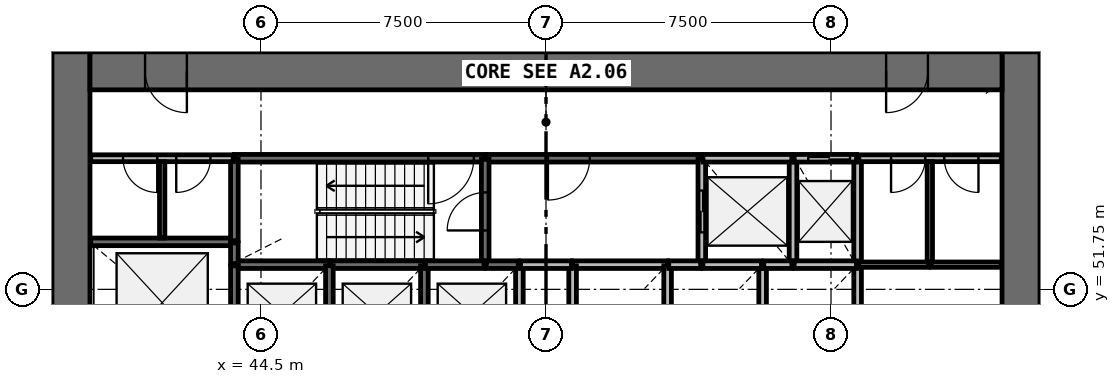
"""IFC4 building model, lengths in metres.
Left out: names, types, materials, properties, quantities, classifications, styles, units other than length and angle.
Written with IfcOpenShell. Run it as: python <this file> out.ifc"""

import sys

from ifc_helpers import new_model, si_unit, direction, frame, frame_2d, origin, place, context, subcontext, project, spatial, rectangle, extrude, source, transform, mapped, element, fill, save


model = new_model("IFC4")
c1 = context("Model", 3, precision=1e-05, world=origin(), true_north=direction((0.0, 1.0)))
c2 = subcontext(c1, "Body", "Model", "MODEL_VIEW")
j1 = project(units=[si_unit("LENGTHUNIT", "METRE"), si_unit("PLANEANGLEUNIT", "RADIAN")], contexts=[c1])
p1 = place(None, origin())
s1 = spatial("IfcSite", under=j1, at=p1, CompositionType="ELEMENT")
p2 = place(p1, origin())
s2 = spatial("IfcBuilding", under=s1, at=p2, CompositionType="ELEMENT")
p3 = place(p2, frame((0.0, 0.0, 22.6)))
s3 = spatial("IfcBuildingStorey", under=s2, at=p3, CompositionType="ELEMENT", Elevation=22.6)
p4 = place(p3, frame((64.5, 38.0, 0.0), z_axis=(0.0, 0.0, 1.0), x_axis=(0.0, 1.0, 0.0)))
e1 = element("IfcWall", 1, at=p4, inside=s3, PredefinedType="SHEAR", context=c2, shape_type="SweptSolid", body=[
    extrude(rectangle(XDim=20.0, YDim=1.0, at=frame_2d((10.0, 0.0))), origin(), (0.0, 0.0, 1.0), 4.4),
])
p5 = place(p4, frame((9.1, 0.0, 0.0)))
e2 = element("IfcOpeningElement", 2, at=p5, cuts=e1, PredefinedType="OPENING", context=c2, shape_type="SweptSolid", body=[
    extrude(rectangle(XDim=1.8, YDim=2.1, at=frame_2d((0.9, 1.05))), frame((0.0, 0.51, 0.0), z_axis=(0.0, -1.0, 0.0), x_axis=(1.0, 0.0, 0.0)), (0.0, 0.0, 1.0), 1.02),
])
p6 = place(p3, frame((39.5, 58.0, 0.0), z_axis=(0.0, 0.0, 1.0), x_axis=(0.0, -1.0, 0.0)))
e3 = element("IfcWall", 3, at=p6, inside=s3, PredefinedType="SHEAR", context=c2, shape_type="SweptSolid", body=[
    extrude(rectangle(XDim=20.0, YDim=1.0, at=frame_2d((10.0, 0.0))), origin(), (0.0, 0.0, 1.0), 4.4),
])
p7 = place(p6, frame((9.1, 0.0, 0.0)))
e4 = element("IfcOpeningElement", 4, at=p7, cuts=e3, PredefinedType="OPENING", context=c2, shape_type="SweptSolid", body=[
    extrude(rectangle(XDim=1.8, YDim=2.1, at=frame_2d((0.9, 1.05))), frame((0.0, 0.51, 0.0), z_axis=(0.0, -1.0, 0.0), x_axis=(1.0, 0.0, 0.0)), (0.0, 0.0, 1.0), 1.02),
])
p8 = place(p3, frame((64.0, 57.5, 0.0), z_axis=(0.0, 0.0, 1.0), x_axis=(-1.0, 0.0, 0.0)))
e5 = element("IfcWall", 5, at=p8, inside=s3, PredefinedType="SHEAR", context=c2, shape_type="SweptSolid", body=[
    extrude(rectangle(XDim=24.0, YDim=1.0, at=frame_2d((12.0, 0.0))), origin(), (0.0, 0.0, 1.0), 4.4),
])
p9 = place(p8, frame((21.45, 0.0, 0.0)))
e6 = element("IfcOpeningElement", 6, at=p9, cuts=e5, PredefinedType="OPENING", context=c2, shape_type="SweptSolid", body=[
    extrude(rectangle(XDim=1.1, YDim=2.1, at=frame_2d((0.55, 1.05))), frame((0.0, 0.51, 0.0), z_axis=(0.0, -1.0, 0.0), x_axis=(1.0, 0.0, 0.0)), (0.0, 0.0, 1.0), 1.02),
])
p10 = place(p8, frame((1.95, 0.0, 0.0)))
e7 = element("IfcOpeningElement", 7, at=p10, cuts=e5, PredefinedType="OPENING", context=c2, shape_type="SweptSolid", body=[
    extrude(rectangle(XDim=1.1, YDim=2.1, at=frame_2d((0.55, 1.05))), frame((0.0, 0.51, 0.0), z_axis=(0.0, -1.0, 0.0), x_axis=(1.0, 0.0, 0.0)), (0.0, 0.0, 1.0), 1.02),
])
p11 = place(p3, frame((50.4, 55.2, 0.0), z_axis=(0.0, 0.0, 1.0), x_axis=(-1.0, 0.0, 0.0)))
e8 = element("IfcWall", 8, at=p11, inside=s3, PredefinedType="SOLIDWALL", context=c2, shape_type="SweptSolid", body=[
    extrude(rectangle(XDim=6.6, YDim=0.2, at=frame_2d((3.3, 0.0))), origin(), (0.0, 0.0, 1.0), 3.95),
])
p12 = place(p11, frame((0.3, 0.0, 0.0)))
e9 = element("IfcOpeningElement", 9, at=p12, cuts=e8, PredefinedType="OPENING", context=c2, shape_type="SweptSolid", body=[
    extrude(rectangle(XDim=1.2, YDim=2.1, at=frame_2d((0.6, 1.05))), frame((0.0, 0.11, 0.0), z_axis=(0.0, -1.0, 0.0), x_axis=(1.0, 0.0, 0.0)), (0.0, 0.0, 1.0), 0.22),
])
p13 = place(p3, frame((56.1, 55.2, 0.0), z_axis=(0.0, 0.0, 1.0), x_axis=(-1.0, 0.0, 0.0)))
e10 = element("IfcWall", 10, at=p13, inside=s3, PredefinedType="SOLIDWALL", context=c2, shape_type="SweptSolid", body=[
    extrude(rectangle(XDim=5.67, YDim=0.2, at=frame_2d((2.835, 0.0))), origin(), (0.0, 0.0, 1.0), 3.95),
])
p14 = place(p13, frame((2.95, 0.0, 0.0)))
e11 = element("IfcOpeningElement", 11, at=p14, cuts=e10, PredefinedType="OPENING", context=c2, shape_type="SweptSolid", body=[
    extrude(rectangle(XDim=1.1, YDim=2.1, at=frame_2d((0.55, 1.05))), frame((0.0, 0.11, 0.0), z_axis=(0.0, -1.0, 0.0), x_axis=(1.0, 0.0, 0.0)), (0.0, 0.0, 1.0), 0.22),
])
p15 = place(p3, frame((43.8, 53.0, 0.0), z_axis=(0.0, 0.0, 1.0), x_axis=(-1.0, 0.0, 0.0)))
e12 = element("IfcWall", 12, at=p15, inside=s3, PredefinedType="SOLIDWALL", context=c2, shape_type="SweptSolid", body=[
    extrude(rectangle(XDim=3.78, YDim=0.2, at=frame_2d((1.89, 0.0))), origin(), (0.0, 0.0, 1.0), 3.95),
])
p16 = place(p3, frame((50.4, 52.4, 0.0), z_axis=(0.0, 0.0, 1.0), x_axis=(0.0, 1.0, 0.0)))
e13 = element("IfcWall", 13, at=p16, inside=s3, PredefinedType="SOLIDWALL", context=c2, shape_type="SweptSolid", body=[
    extrude(rectangle(XDim=2.77, YDim=0.2, at=frame_2d((1.385, 0.0))), origin(), (0.0, 0.0, 1.0), 3.95),
])
p17 = place(p16, frame((0.9, 0.0, 0.0)))
e14 = element("IfcOpeningElement", 14, at=p17, cuts=e13, PredefinedType="OPENING", context=c2, shape_type="SweptSolid", body=[
    extrude(rectangle(XDim=1.0, YDim=2.1, at=frame_2d((0.5, 1.05))), frame((0.0, 0.11, 0.0), z_axis=(0.0, -1.0, 0.0), x_axis=(1.0, 0.0, 0.0)), (0.0, 0.0, 1.0), 0.22),
])
p18 = place(p3, frame((56.1, 55.17, 0.0), z_axis=(0.0, 0.0, 1.0), x_axis=(0.0, -1.0, 0.0)))
e15 = element("IfcWall", 15, at=p18, inside=s3, PredefinedType="SOLIDWALL", context=c2, shape_type="SweptSolid", body=[
    extrude(rectangle(XDim=2.77, YDim=0.2, at=frame_2d((1.385, 0.0))), origin(), (0.0, 0.0, 1.0), 3.95),
])
p19 = place(p18, frame((0.82, 0.0, 0.0)))
e16 = element("IfcOpeningElement", 16, at=p19, cuts=e15, PredefinedType="OPENING", context=c2, shape_type="SweptSolid", body=[
    extrude(rectangle(XDim=1.1, YDim=2.1, at=frame_2d((0.55, 1.05))), frame((0.0, 0.11, 0.0), z_axis=(0.0, -1.0, 0.0), x_axis=(1.0, 0.0, 0.0)), (0.0, 0.0, 1.0), 0.22),
])
for number, where, z_axis, x_axis in (
    (17, (58.5, 52.4, 0.0), (0.0, 0.0, 1.0), (0.0, 1.0, 0.0)),
    (18, (60.2, 52.4, 0.0), (0.0, 0.0, 1.0), (0.0, 1.0, 0.0)),
):
    element("IfcWall", number, at=place(p3, frame(where, z_axis=z_axis, x_axis=x_axis)), inside=s3, PredefinedType="SOLIDWALL", context=c2, shape_type="SweptSolid", body=[
        extrude(rectangle(XDim=2.8, YDim=0.2, at=frame_2d((1.4, 0.0))), origin(), (0.0, 0.0, 1.0), 3.95),
    ])
p20 = place(p3, frame((46.3, 52.4, 0.0), z_axis=(0.0, 0.0, 1.0), x_axis=(-1.0, 0.0, 0.0)))
e19 = element("IfcWall", 19, at=p20, inside=s3, PredefinedType="SOLIDWALL", context=c2, shape_type="SweptSolid", body=[
    extrude(rectangle(XDim=2.5, YDim=0.2, at=frame_2d((1.25, 0.0))), origin(), (0.0, 0.0, 1.0), 3.95),
])
p21 = place(p3, frame((48.8, 52.4, 0.0), z_axis=(0.0, 0.0, 1.0), x_axis=(-1.0, 0.0, 0.0)))
e20 = element("IfcWall", 20, at=p21, inside=s3, PredefinedType="SOLIDWALL", context=c2, shape_type="SweptSolid", body=[
    extrude(rectangle(XDim=2.47, YDim=0.2, at=frame_2d((1.235, 0.0))), origin(), (0.0, 0.0, 1.0), 3.95),
])
p22 = place(p3, frame((55.2, 52.4, 0.0), z_axis=(0.0, 0.0, 1.0), x_axis=(-1.0, 0.0, 0.0)))
e21 = element("IfcWall", 21, at=p22, inside=s3, PredefinedType="SOLIDWALL", context=c2, shape_type="SweptSolid", body=[
    extrude(rectangle(XDim=2.5, YDim=0.2, at=frame_2d((1.25, 0.0))), origin(), (0.0, 0.0, 1.0), 3.95),
])
p23 = place(p3, frame((58.47, 55.2, 0.0), z_axis=(0.0, 0.0, 1.0), x_axis=(-1.0, 0.0, 0.0)))
e22 = element("IfcWall", 22, at=p23, inside=s3, PredefinedType="SOLIDWALL", context=c2, shape_type="SweptSolid", body=[
    extrude(rectangle(XDim=2.34, YDim=0.2, at=frame_2d((1.17, 0.0))), origin(), (0.0, 0.0, 1.0), 3.95),
])
for number, where, z_axis, x_axis in (
    (23, (43.8, 52.37, 0.0), (0.0, 0.0, 1.0), (0.0, -1.0, 0.0)),
    (24, (46.3, 50.01, 0.0), (0.0, 0.0, 1.0), (0.0, 1.0, 0.0)),
    (25, (48.8, 50.01, 0.0), (0.0, 0.0, 1.0), (0.0, 1.0, 0.0)),
):
    element("IfcWall", number, at=place(p3, frame(where, z_axis=z_axis, x_axis=x_axis)), inside=s3, PredefinedType="SOLIDWALL", context=c2, shape_type="SweptSolid", body=[
        extrude(rectangle(XDim=2.36, YDim=0.2, at=frame_2d((1.18, 0.0))), origin(), (0.0, 0.0, 1.0), 3.95),
    ])
p24 = place(p3, frame((51.3, 50.01, 0.0), z_axis=(0.0, 0.0, 1.0), x_axis=(0.0, 1.0, 0.0)))
e26 = element("IfcWall", 26, at=p24, inside=s3, PredefinedType="SOLIDWALL", context=c2, shape_type="SweptSolid", body=[
    extrude(rectangle(XDim=2.39, YDim=0.2, at=frame_2d((1.195, 0.0))), origin(), (0.0, 0.0, 1.0), 3.95),
])
for number, where, z_axis, x_axis in (
    (27, (52.7, 52.37, 0.0), (0.0, 0.0, 1.0), (0.0, -1.0, 0.0)),
    (28, (55.2, 50.01, 0.0), (0.0, 0.0, 1.0), (0.0, 1.0, 0.0)),
):
    element("IfcWall", number, at=place(p3, frame(where, z_axis=z_axis, x_axis=x_axis)), inside=s3, PredefinedType="SOLIDWALL", context=c2, shape_type="SweptSolid", body=[
        extrude(rectangle(XDim=2.36, YDim=0.2, at=frame_2d((1.18, 0.0))), origin(), (0.0, 0.0, 1.0), 3.95),
    ])
p25 = place(p3, frame((57.7, 50.01, 0.0), z_axis=(0.0, 0.0, 1.0), x_axis=(0.0, 1.0, 0.0)))
e29 = element("IfcWall", 29, at=p25, inside=s3, PredefinedType="SOLIDWALL", context=c2, shape_type="SweptSolid", body=[
    extrude(rectangle(XDim=2.39, YDim=0.2, at=frame_2d((1.195, 0.0))), origin(), (0.0, 0.0, 1.0), 3.95),
])
p26 = place(p3, frame((60.2, 50.01, 0.0), z_axis=(0.0, 0.0, 1.0), x_axis=(0.0, 1.0, 0.0)))
e30 = element("IfcWall", 30, at=p26, inside=s3, PredefinedType="SOLIDWALL", context=c2, shape_type="SweptSolid", body=[
    extrude(rectangle(XDim=2.36, YDim=0.2, at=frame_2d((1.18, 0.0))), origin(), (0.0, 0.0, 1.0), 3.95),
])
p27 = place(p3, frame((43.8, 55.17, 0.0), z_axis=(0.0, 0.0, 1.0), x_axis=(0.0, -1.0, 0.0)))
e31 = element("IfcWall", 31, at=p27, inside=s3, PredefinedType="SOLIDWALL", context=c2, shape_type="SweptSolid", body=[
    extrude(rectangle(XDim=2.14, YDim=0.2, at=frame_2d((1.07, 0.0))), origin(), (0.0, 0.0, 1.0), 3.95),
])
p28 = place(p3, frame((60.17, 52.4, 0.0), z_axis=(0.0, 0.0, 1.0), x_axis=(-1.0, 0.0, 0.0)))
e32 = element("IfcWall", 32, at=p28, inside=s3, PredefinedType="SOLIDWALL", context=c2, shape_type="SweptSolid", body=[
    extrude(rectangle(XDim=1.64, YDim=0.2, at=frame_2d((0.82, 0.0))), origin(), (0.0, 0.0, 1.0), 3.95),
])
p29 = place(p3, frame((60.17, 55.2, 0.0), z_axis=(0.0, 0.0, 1.0), x_axis=(-1.0, 0.0, 0.0)))
e33 = element("IfcWall", 33, at=p29, inside=s3, PredefinedType="SOLIDWALL", context=c2, shape_type="SweptSolid", body=[
    extrude(rectangle(XDim=1.64, YDim=0.2, at=frame_2d((0.82, 0.0))), origin(), (0.0, 0.0, 1.0), 3.95),
])
p30 = place(p29, frame((0.17, 0.0, 0.0)))
e34 = element("IfcOpeningElement", 34, at=p30, cuts=e33, PredefinedType="OPENING", context=c2, shape_type="SweptSolid", body=[
    extrude(rectangle(XDim=1.1, YDim=2.1, at=frame_2d((0.55, 1.05))), frame((0.0, 0.11, 0.0), z_axis=(0.0, -1.0, 0.0), x_axis=(1.0, 0.0, 0.0)), (0.0, 0.0, 1.0), 0.22),
])
for number, where, z_axis, x_axis in (
    (35, (50.37, 52.4, 0.0), (0.0, 0.0, 1.0), (-1.0, 0.0, 0.0)),
    (36, (57.67, 52.4, 0.0), (0.0, 0.0, 1.0), (-1.0, 0.0, 0.0)),
):
    element("IfcWall", number, at=place(p3, frame(where, z_axis=z_axis, x_axis=x_axis)), inside=s3, PredefinedType="SOLIDWALL", context=c2, shape_type="SweptSolid", body=[
        extrude(rectangle(XDim=1.54, YDim=0.2, at=frame_2d((0.77, 0.0))), origin(), (0.0, 0.0, 1.0), 3.95),
    ])
p31 = place(p3, frame((51.33, 52.4, 0.0), z_axis=(0.0, 0.0, 1.0), x_axis=(1.0, 0.0, 0.0)))
e37 = element("IfcWall", 37, at=p31, inside=s3, PredefinedType="SOLIDWALL", context=c2, shape_type="SweptSolid", body=[
    extrude(rectangle(XDim=1.34, YDim=0.2, at=frame_2d((0.67, 0.0))), origin(), (0.0, 0.0, 1.0), 3.95),
])
for number, where, z_axis, x_axis in (
    (38, (51.27, 52.4, 0.0), (0.0, 0.0, 1.0), (-1.0, 0.0, 0.0)),
    (39, (56.07, 52.4, 0.0), (0.0, 0.0, 1.0), (-1.0, 0.0, 0.0)),
):
    element("IfcWall", number, at=place(p3, frame(where, z_axis=z_axis, x_axis=x_axis)), inside=s3, PredefinedType="SOLIDWALL", context=c2, shape_type="SweptSolid", body=[
        extrude(rectangle(XDim=0.84, YDim=0.2, at=frame_2d((0.42, 0.0))), origin(), (0.0, 0.0, 1.0), 3.95),
    ])
p32 = place(p3, frame((58.47, 52.4, 0.0), z_axis=(0.0, 0.0, 1.0), x_axis=(-1.0, 0.0, 0.0)))
e40 = element("IfcWall", 40, at=p32, inside=s3, PredefinedType="SOLIDWALL", context=c2, shape_type="SweptSolid", body=[
    extrude(rectangle(XDim=0.74, YDim=0.2, at=frame_2d((0.37, 0.0))), origin(), (0.0, 0.0, 1.0), 3.95),
])
p33 = place(p3, frame((43.8, 52.43, 0.0), z_axis=(0.0, 0.0, 1.0), x_axis=(0.0, 1.0, 0.0)))
e41 = element("IfcWall", 41, at=p33, inside=s3, PredefinedType="SOLIDWALL", context=c2, shape_type="SweptSolid", body=[
    extrude(rectangle(XDim=0.54, YDim=0.2, at=frame_2d((0.27, 0.0))), origin(), (0.0, 0.0, 1.0), 3.95),
])
p34 = place(p3, frame((43.77, 55.2, 0.0), z_axis=(0.0, 0.0, 1.0), x_axis=(-1.0, 0.0, 0.0)))
e42 = element("IfcWall", 42, at=p34, inside=s3, PredefinedType="PARTITIONING", context=c2, shape_type="SweptSolid", body=[
    extrude(rectangle(XDim=3.75, YDim=0.18, at=frame_2d((1.875, 0.0))), origin(), (0.0, 0.0, 1.0), 3.95),
])
p35 = place(p34, frame((2.0, 0.0, 0.0)))
e43 = element("IfcOpeningElement", 43, at=p35, cuts=e42, PredefinedType="OPENING", context=c2, shape_type="SweptSolid", body=[
    extrude(rectangle(XDim=0.9, YDim=2.1, at=frame_2d((0.45, 1.05))), frame((0.0, 0.1, 0.0), z_axis=(0.0, -1.0, 0.0), x_axis=(1.0, 0.0, 0.0)), (0.0, 0.0, 1.0), 0.2),
])
p36 = place(p34, frame((0.6, 0.0, 0.0)))
e44 = element("IfcOpeningElement", 44, at=p36, cuts=e42, PredefinedType="OPENING", context=c2, shape_type="SweptSolid", body=[
    extrude(rectangle(XDim=0.9, YDim=2.1, at=frame_2d((0.45, 1.05))), frame((0.0, 0.1, 0.0), z_axis=(0.0, -1.0, 0.0), x_axis=(1.0, 0.0, 0.0)), (0.0, 0.0, 1.0), 0.2),
])
p37 = place(p3, frame((63.98, 55.2, 0.0), z_axis=(0.0, 0.0, 1.0), x_axis=(-1.0, 0.0, 0.0)))
e45 = element("IfcWall", 45, at=p37, inside=s3, PredefinedType="PARTITIONING", context=c2, shape_type="SweptSolid", body=[
    extrude(rectangle(XDim=3.75, YDim=0.18, at=frame_2d((1.875, 0.0))), origin(), (0.0, 0.0, 1.0), 3.95),
])
p38 = place(p37, frame((2.0, 0.0, 0.0)))
e46 = element("IfcOpeningElement", 46, at=p38, cuts=e45, PredefinedType="OPENING", context=c2, shape_type="SweptSolid", body=[
    extrude(rectangle(XDim=0.9, YDim=2.1, at=frame_2d((0.45, 1.05))), frame((0.0, 0.1, 0.0), z_axis=(0.0, -1.0, 0.0), x_axis=(1.0, 0.0, 0.0)), (0.0, 0.0, 1.0), 0.2),
])
p39 = place(p37, frame((0.6, 0.0, 0.0)))
e47 = element("IfcOpeningElement", 47, at=p39, cuts=e45, PredefinedType="OPENING", context=c2, shape_type="SweptSolid", body=[
    extrude(rectangle(XDim=0.9, YDim=2.1, at=frame_2d((0.45, 1.05))), frame((0.0, 0.1, 0.0), z_axis=(0.0, -1.0, 0.0), x_axis=(1.0, 0.0, 0.0)), (0.0, 0.0, 1.0), 0.2),
])
p40 = place(p3, frame((62.1, 52.4, 0.0), z_axis=(0.0, 0.0, 1.0), x_axis=(0.0, 1.0, 0.0)))
e48 = element("IfcWall", 48, at=p40, inside=s3, PredefinedType="PARTITIONING", context=c2, shape_type="SweptSolid", body=[
    extrude(rectangle(XDim=2.71, YDim=0.14, at=frame_2d((1.355, 0.0))), origin(), (0.0, 0.0, 1.0), 3.05),
])
p41 = place(p3, frame((41.9, 53.1, 0.0), z_axis=(0.0, 0.0, 1.0), x_axis=(0.0, 1.0, 0.0)))
e49 = element("IfcWall", 49, at=p41, inside=s3, PredefinedType="PARTITIONING", context=c2, shape_type="SweptSolid", body=[
    extrude(rectangle(XDim=2.01, YDim=0.14, at=frame_2d((1.005, 0.0))), origin(), (0.0, 0.0, 1.0), 3.05),
])
p42 = place(p3, frame((62.07, 52.4, 0.0), z_axis=(0.0, 0.0, 1.0), x_axis=(-1.0, 0.0, 0.0)))
e50 = element("IfcWall", 50, at=p42, inside=s3, PredefinedType="PARTITIONING", context=c2, shape_type="SweptSolid", body=[
    extrude(rectangle(XDim=1.84, YDim=0.14, at=frame_2d((0.92, 0.0))), origin(), (0.0, 0.0, 1.0), 3.05),
])
p43 = place(p3, frame((63.98, 52.4, 0.0), z_axis=(0.0, 0.0, 1.0), x_axis=(-1.0, 0.0, 0.0)))
e51 = element("IfcWall", 51, at=p43, inside=s3, PredefinedType="PARTITIONING", context=c2, shape_type="SweptSolid", body=[
    extrude(rectangle(XDim=1.85, YDim=0.14, at=frame_2d((0.925, 0.0))), origin(), (0.0, 0.0, 1.0), 3.05),
])
m1 = source(origin(), c2, "Body", "SweptSolid", [
    extrude(rectangle(XDim=1.1, YDim=2.1, at=frame_2d((0.55, 1.05))), frame((0.0, 0.025, 0.0), z_axis=(0.0, -1.0, 0.0), x_axis=(1.0, 0.0, 0.0)), (0.0, 0.0, 1.0), 0.05),
])
p44 = place(p19, origin())
e52 = element("IfcDoor", 52, at=p44, inside=s3, OperationType="DOUBLE_DOOR_SLIDING", PredefinedType="USERDEFINED", context=c2, shape_type="MappedRepresentation", body=[
    mapped(m1, transform((0.0, 0.0, 0.0), scale=1.0)),
])
fill(e16, e52)
p45 = place(p30, origin())
e53 = element("IfcDoor", 53, at=p45, inside=s3, OperationType="DOUBLE_DOOR_SLIDING", PredefinedType="USERDEFINED", context=c2, shape_type="MappedRepresentation", body=[
    mapped(m1, transform((0.0, 0.0, 0.0), scale=1.0)),
])
fill(e34, e53)
m2 = source(origin(), c2, "Body", "SweptSolid", [
    extrude(rectangle(XDim=1.2, YDim=2.1, at=frame_2d((0.6, 1.05))), frame((0.0, 0.025, 0.0), z_axis=(0.0, -1.0, 0.0), x_axis=(1.0, 0.0, 0.0)), (0.0, 0.0, 1.0), 0.05),
])
p46 = place(p12, origin())
e54 = element("IfcDoor", 54, at=p46, inside=s3, OperationType="SINGLE_SWING_RIGHT", PredefinedType="DOOR", context=c2, shape_type="MappedRepresentation", body=[
    mapped(m2, transform((0.0, 0.0, 0.0), scale=1.0)),
])
fill(e9, e54)
m3 = source(origin(), c2, "Body", "SweptSolid", [
    extrude(rectangle(XDim=1.0, YDim=2.1, at=frame_2d((0.5, 1.05))), frame((0.0, 0.025, 0.0), z_axis=(0.0, -1.0, 0.0), x_axis=(1.0, 0.0, 0.0)), (0.0, 0.0, 1.0), 0.05),
])
p47 = place(p17, origin())
e55 = element("IfcDoor", 55, at=p47, inside=s3, OperationType="SINGLE_SWING_LEFT", PredefinedType="DOOR", context=c2, shape_type="MappedRepresentation", body=[
    mapped(m3, transform((0.0, 0.0, 0.0), scale=1.0)),
])
fill(e14, e55)
m4 = source(origin(), c2, "Body", "SweptSolid", [
    extrude(rectangle(XDim=1.1, YDim=2.1, at=frame_2d((0.55, 1.05))), frame((0.0, 0.025, 0.0), z_axis=(0.0, -1.0, 0.0), x_axis=(1.0, 0.0, 0.0)), (0.0, 0.0, 1.0), 0.05),
])
p48 = place(p14, origin())
e56 = element("IfcDoor", 56, at=p48, inside=s3, OperationType="SINGLE_SWING_RIGHT", PredefinedType="DOOR", context=c2, shape_type="MappedRepresentation", body=[
    mapped(m4, transform((0.0, 0.0, 0.0), scale=1.0)),
])
fill(e11, e56)
m5 = source(origin(), c2, "Body", "SweptSolid", [
    extrude(rectangle(XDim=1.1, YDim=2.1, at=frame_2d((0.55, 1.05))), frame((0.0, 0.025, 0.0), z_axis=(0.0, -1.0, 0.0), x_axis=(1.0, 0.0, 0.0)), (0.0, 0.0, 1.0), 0.05),
])
p49 = place(p9, origin())
e57 = element("IfcDoor", 57, at=p49, inside=s3, OperationType="SINGLE_SWING_LEFT", PredefinedType="DOOR", context=c2, shape_type="MappedRepresentation", body=[
    mapped(m5, transform((0.0, 0.0, 0.0), scale=1.0)),
])
fill(e6, e57)
p50 = place(p10, origin())
e58 = element("IfcDoor", 58, at=p50, inside=s3, OperationType="SINGLE_SWING_RIGHT", PredefinedType="DOOR", context=c2, shape_type="MappedRepresentation", body=[
    mapped(m5, transform((0.0, 0.0, 0.0), scale=1.0)),
])
fill(e7, e58)
m6 = source(origin(), c2, "Body", "SweptSolid", [
    extrude(rectangle(XDim=0.9, YDim=2.1, at=frame_2d((0.45, 1.05))), frame((0.0, 0.025, 0.0), z_axis=(0.0, -1.0, 0.0), x_axis=(1.0, 0.0, 0.0)), (0.0, 0.0, 1.0), 0.05),
])
p51 = place(p35, origin())
e59 = element("IfcDoor", 59, at=p51, inside=s3, OperationType="SINGLE_SWING_LEFT", PredefinedType="DOOR", context=c2, shape_type="MappedRepresentation", body=[
    mapped(m6, transform((0.0, 0.0, 0.0), scale=1.0)),
])
fill(e43, e59)
p52 = place(p36, origin())
e60 = element("IfcDoor", 60, at=p52, inside=s3, OperationType="SINGLE_SWING_RIGHT", PredefinedType="DOOR", context=c2, shape_type="MappedRepresentation", body=[
    mapped(m6, transform((0.0, 0.0, 0.0), scale=1.0)),
])
fill(e44, e60)
p53 = place(p38, origin())
e61 = element("IfcDoor", 61, at=p53, inside=s3, OperationType="SINGLE_SWING_RIGHT", PredefinedType="DOOR", context=c2, shape_type="MappedRepresentation", body=[
    mapped(m6, transform((0.0, 0.0, 0.0), scale=1.0)),
])
fill(e46, e61)
p54 = place(p39, origin())
e62 = element("IfcDoor", 62, at=p54, inside=s3, OperationType="SINGLE_SWING_LEFT", PredefinedType="DOOR", context=c2, shape_type="MappedRepresentation", body=[
    mapped(m6, transform((0.0, 0.0, 0.0), scale=1.0)),
])
fill(e47, e62)
save(model, sys.argv[1])
